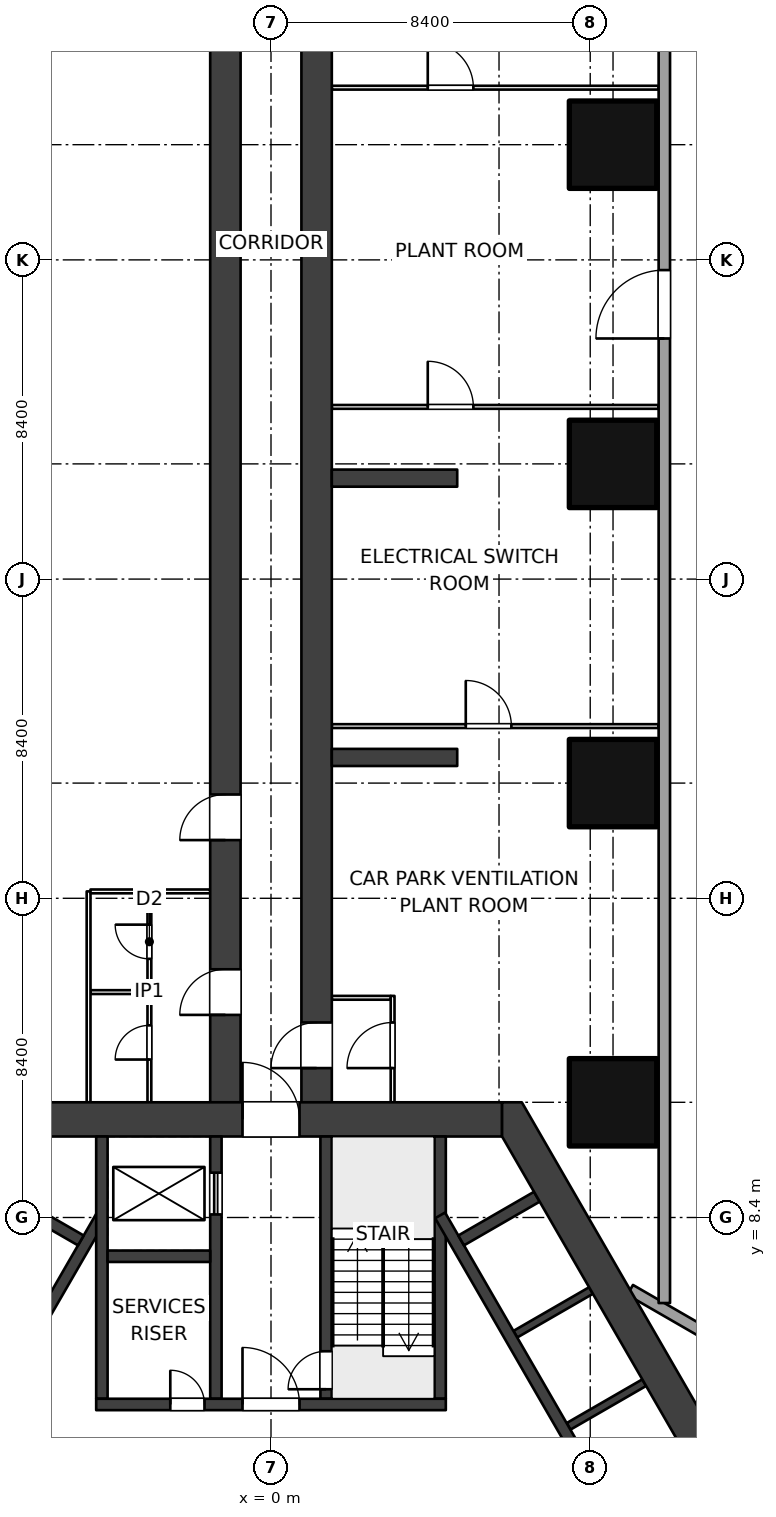
"""IFC4 building model, lengths in metres.
Left out: names, types, materials, properties, quantities, classifications, styles, units other than length and angle.
Written with IfcOpenShell. Run it as: python <this file> out.ifc"""

import sys

from ifc_helpers import new_model, si_unit, direction, frame, frame_2d, origin, origin_2d, place, context, subcontext, project, spatial, polyline, rectangle, outline, extrude, element, fill, save


model = new_model("IFC4")
c1 = context("Model", 3, precision=1e-05, world=origin(), true_north=direction((0.0, 1.0)))
c2 = subcontext(c1, "Body", "Model", "MODEL_VIEW")
j1 = project(units=[si_unit("LENGTHUNIT", "METRE"), si_unit("PLANEANGLEUNIT", "RADIAN")], contexts=[c1])
p1 = place(None, origin())
s1 = spatial("IfcSite", under=j1, at=p1, CompositionType="ELEMENT")
p2 = place(p1, origin())
s2 = spatial("IfcBuilding", under=s1, at=p2, CompositionType="ELEMENT")
p3 = place(p2, frame((0.0, 0.0, -3.5)))
s3 = spatial("IfcBuildingStorey", under=s2, at=p3, CompositionType="ELEMENT", Elevation=-3.5)
for number, where, z_axis, x_axis in (
    (1, (9.0, 11.432, 0.0), (0.0, 0.0, 1.0), (1.0, 0.0, 0.0)),
    (2, (9.0, 19.832, 0.0), (0.0, 0.0, 1.0), (1.0, 0.0, 0.0)),
    (3, (9.0, 28.231, 0.0), (0.0, 0.0, 1.0), (1.0, 0.0, 0.0)),
    (4, (9.0, 36.632, 0.0), (0.0, 0.0, 1.0), (1.0, 0.0, 0.0)),
):
    element("IfcColumn", number, at=place(p3, frame(where, z_axis=z_axis, x_axis=x_axis)), inside=s3, PredefinedType="COLUMN", context=c2, shape_type="SweptSolid", body=[
        extrude(rectangle(XDim=2.3, YDim=2.3, at=origin_2d()), origin(), (0.0, 0.0, 1.0), 3.5),
    ])
p4 = place(p3, frame((-6.08, 10.981, 0.0), z_axis=(0.0, 0.0, 1.0), x_axis=(1.0, 0.0, 0.0)))
e5 = element("IfcWall", 5, at=p4, inside=s3, PredefinedType="SHEAR", context=c2, shape_type="SweptSolid", body=[
    extrude(rectangle(XDim=12.161, YDim=0.9, at=frame_2d((6.08, 0.0))), origin(), (0.0, 0.0, 1.0), 3.5),
])
p5 = place(p4, frame((5.33, 0.0, 0.0)))
e6 = element("IfcOpeningElement", 6, at=p5, cuts=e5, PredefinedType="OPENING", context=c2, shape_type="SweptSolid", body=[
    extrude(rectangle(XDim=1.5, YDim=2.1, at=frame_2d((0.75, 1.05))), frame((0.0, 0.46, 0.0), z_axis=(0.0, -1.0, 0.0), x_axis=(1.0, 0.0, 0.0)), (0.0, 0.0, 1.0), 0.92),
])
p6 = place(p3, origin())
e7 = element("IfcWall", 7, at=p6, inside=s3, PredefinedType="SHEAR", context=c2, shape_type="SweptSolid", body=[
    extrude(outline(polyline([(13.2, 0.0), (6.6, 11.432), (6.08, 11.432), (6.08, 10.531), (12.161, 0.0), (12.94, -0.45), (13.2, 0.0)])), origin(), (0.0, 0.0, 1.0), 3.5),
])
p7 = place(p3, frame((-4.6, 3.48, 0.0), z_axis=(0.0, 0.0, 1.0), x_axis=(1.0, 0.0, 0.0)))
e8 = element("IfcWall", 8, at=p7, inside=s3, PredefinedType="SHEAR", context=c2, shape_type="SweptSolid", body=[
    extrude(rectangle(XDim=9.2, YDim=0.3, at=frame_2d((4.6, 0.0))), origin(), (0.0, 0.0, 1.0), 3.5),
])
p8 = place(p7, frame((3.85, 0.0, 0.0)))
e9 = element("IfcOpeningElement", 9, at=p8, cuts=e8, PredefinedType="OPENING", context=c2, shape_type="SweptSolid", body=[
    extrude(rectangle(XDim=1.5, YDim=2.1, at=frame_2d((0.75, 1.05))), frame((0.0, 0.16, 0.0), z_axis=(0.0, -1.0, 0.0), x_axis=(1.0, 0.0, 0.0)), (0.0, 0.0, 1.0), 0.32),
])
p9 = place(p7, frame((1.95, 0.0, 0.0)))
e10 = element("IfcOpeningElement", 10, at=p9, cuts=e8, PredefinedType="OPENING", context=c2, shape_type="SweptSolid", body=[
    extrude(rectangle(XDim=0.9, YDim=2.1, at=frame_2d((0.45, 1.05))), frame((0.0, 0.16, 0.0), z_axis=(0.0, -1.0, 0.0), x_axis=(1.0, 0.0, 0.0)), (0.0, 0.0, 1.0), 0.32),
])
p10 = place(p3, frame((1.45, 3.63, 0.0), z_axis=(0.0, 0.0, 1.0), x_axis=(0.0, 1.0, 0.0)))
e11 = element("IfcWall", 11, at=p10, inside=s3, PredefinedType="SHEAR", context=c2, shape_type="SweptSolid", body=[
    extrude(rectangle(XDim=6.902, YDim=0.3, at=frame_2d((3.451, 0.0))), origin(), (0.0, 0.0, 1.0), 3.5),
])
p11 = place(p10, frame((0.25, 0.0, 0.0)))
e12 = element("IfcOpeningElement", 12, at=p11, cuts=e11, PredefinedType="OPENING", context=c2, shape_type="SweptSolid", body=[
    extrude(rectangle(XDim=1.0, YDim=2.1, at=frame_2d((0.5, 1.05))), frame((0.0, 0.16, 0.0), z_axis=(0.0, -1.0, 0.0), x_axis=(1.0, 0.0, 0.0)), (0.0, 0.0, 1.0), 0.32),
])
p12 = place(p3, frame((4.45, 3.63, 0.0), z_axis=(0.0, 0.0, 1.0), x_axis=(0.0, 1.0, 0.0)))
e13 = element("IfcWall", 13, at=p12, inside=s3, PredefinedType="SHEAR", context=c2, shape_type="SweptSolid", body=[
    extrude(rectangle(XDim=6.902, YDim=0.3, at=frame_2d((3.451, 0.0))), origin(), (0.0, 0.0, 1.0), 3.5),
])
p13 = place(p3, frame((-1.45, 3.63, 0.0), z_axis=(0.0, 0.0, 1.0), x_axis=(0.0, 1.0, 0.0)))
e14 = element("IfcWall", 14, at=p13, inside=s3, PredefinedType="SHEAR", context=c2, shape_type="SweptSolid", body=[
    extrude(rectangle(XDim=6.902, YDim=0.3, at=frame_2d((3.451, 0.0))), origin(), (0.0, 0.0, 1.0), 3.5),
])
p14 = place(p13, frame((4.85, 0.0, 0.0)))
e15 = element("IfcOpeningElement", 15, at=p14, cuts=e14, PredefinedType="OPENING", context=c2, shape_type="SweptSolid", body=[
    extrude(rectangle(XDim=1.1, YDim=2.1, at=frame_2d((0.55, 1.05))), frame((0.0, 0.16, 0.0), z_axis=(0.0, -1.0, 0.0), x_axis=(1.0, 0.0, 0.0)), (0.0, 0.0, 1.0), 0.32),
])
p15 = place(p3, frame((-4.45, 3.63, 0.0), z_axis=(0.0, 0.0, 1.0), x_axis=(0.0, 1.0, 0.0)))
e16 = element("IfcWall", 16, at=p15, inside=s3, PredefinedType="SHEAR", context=c2, shape_type="SweptSolid", body=[
    extrude(rectangle(XDim=6.902, YDim=0.3, at=frame_2d((3.451, 0.0))), origin(), (0.0, 0.0, 1.0), 3.5),
])
p16 = place(p3, frame((-4.3, 7.38, 0.0), z_axis=(0.0, 0.0, 1.0), x_axis=(1.0, 0.0, 0.0)))
e17 = element("IfcWall", 17, at=p16, inside=s3, PredefinedType="SHEAR", context=c2, shape_type="SweptSolid", body=[
    extrude(rectangle(XDim=2.7, YDim=0.3, at=frame_2d((1.35, 0.0))), origin(), (0.0, 0.0, 1.0), 3.5),
])
p17 = place(p3, frame((4.45, 8.455, 0.0), z_axis=(0.0, 0.0, 1.0), x_axis=(0.500002290144, -0.866024081565, 0.0)))
e18 = element("IfcWall", 18, at=p17, inside=s3, PredefinedType="SHEAR", context=c2, shape_type="SweptSolid", body=[
    extrude(rectangle(XDim=10.195, YDim=0.3, at=frame_2d((5.098, 0.0))), origin(), (0.0, 0.0, 1.0), 3.5),
])
p18 = place(p3, frame((5.004, 7.796, 0.0), z_axis=(0.0, 0.0, 1.0), x_axis=(0.866053019151, 0.499952165731, 0.0)))
e19 = element("IfcWall", 19, at=p18, inside=s3, PredefinedType="SHEAR", context=c2, shape_type="SweptSolid", body=[
    extrude(rectangle(XDim=2.3, YDim=0.3, at=frame_2d((1.15, 0.0))), origin(), (0.0, 0.0, 1.0), 3.5),
])
for number, where, z_axis, x_axis in (
    (20, (6.429, 5.328, 0.0), (0.0, 0.0, 1.0), (0.866, 0.5, 0.0)),
    (21, (7.829, 2.903, 0.0), (0.0, 0.0, 1.0), (0.866, 0.5, 0.0)),
):
    element("IfcWall", number, at=place(p3, frame(where, z_axis=z_axis, x_axis=x_axis)), inside=s3, PredefinedType="SHEAR", context=c2, shape_type="SweptSolid", body=[
        extrude(rectangle(XDim=2.3, YDim=0.2, at=frame_2d((1.15, 0.0))), origin(), (0.0, 0.0, 1.0), 3.5),
    ])
p19 = place(p3, frame((-9.548, -0.374, 0.0), z_axis=(0.0, 0.0, 1.0), x_axis=(0.500002290144, 0.866024081565, 0.0)))
e22 = element("IfcWall", 22, at=p19, inside=s3, PredefinedType="SHEAR", context=c2, shape_type="SweptSolid", body=[
    extrude(rectangle(XDim=10.195, YDim=0.3, at=frame_2d((5.098, 0.0))), origin(), (0.0, 0.0, 1.0), 3.5),
])
p20 = place(p3, frame((-5.004, 7.796, 0.0), z_axis=(0.0, 0.0, 1.0), x_axis=(-0.866053019151, 0.499952165731, 0.0)))
e23 = element("IfcWall", 23, at=p20, inside=s3, PredefinedType="SHEAR", context=c2, shape_type="SweptSolid", body=[
    extrude(rectangle(XDim=2.3, YDim=0.3, at=frame_2d((1.15, 0.0))), origin(), (0.0, 0.0, 1.0), 3.5),
])
p21 = place(p3, frame((-1.2, 10.981, 0.0), z_axis=(0.0, 0.0, 1.0), x_axis=(0.0, 1.0, 0.0)))
e24 = element("IfcWall", 24, at=p21, inside=s3, PredefinedType="SHEAR", context=c2, shape_type="SweptSolid", body=[
    extrude(rectangle(XDim=36.75, YDim=0.8, at=frame_2d((18.375, 0.0))), origin(), (0.0, 0.0, 1.0), 3.5),
])
p22 = place(p21, frame((2.75, 0.0, 0.0)))
e25 = element("IfcOpeningElement", 25, at=p22, cuts=e24, PredefinedType="OPENING", context=c2, shape_type="SweptSolid", body=[
    extrude(rectangle(XDim=1.2, YDim=2.1, at=frame_2d((0.6, 1.05))), frame((0.0, 0.41, 0.0), z_axis=(0.0, -1.0, 0.0), x_axis=(1.0, 0.0, 0.0)), (0.0, 0.0, 1.0), 0.82),
])
p23 = place(p21, frame((7.35, 0.0, 0.0)))
e26 = element("IfcOpeningElement", 26, at=p23, cuts=e24, PredefinedType="OPENING", context=c2, shape_type="SweptSolid", body=[
    extrude(rectangle(XDim=1.2, YDim=2.1, at=frame_2d((0.6, 1.05))), frame((0.0, 0.41, 0.0), z_axis=(0.0, -1.0, 0.0), x_axis=(1.0, 0.0, 0.0)), (0.0, 0.0, 1.0), 0.82),
])
p24 = place(p3, frame((1.2, 10.981, 0.0), z_axis=(0.0, 0.0, 1.0), x_axis=(0.0, 1.0, 0.0)))
e27 = element("IfcWall", 27, at=p24, inside=s3, PredefinedType="SHEAR", context=c2, shape_type="SweptSolid", body=[
    extrude(rectangle(XDim=36.75, YDim=0.8, at=frame_2d((18.375, 0.0))), origin(), (0.0, 0.0, 1.0), 3.5),
])
p25 = place(p24, frame((1.35, 0.0, 0.0)))
e28 = element("IfcOpeningElement", 28, at=p25, cuts=e27, PredefinedType="OPENING", context=c2, shape_type="SweptSolid", body=[
    extrude(rectangle(XDim=1.2, YDim=2.1, at=frame_2d((0.6, 1.05))), frame((0.0, 0.41, 0.0), z_axis=(0.0, -1.0, 0.0), x_axis=(1.0, 0.0, 0.0)), (0.0, 0.0, 1.0), 0.82),
])
p26 = place(p3, frame((-3.2, 11.432, 0.0), z_axis=(0.0, 0.0, 1.0), x_axis=(0.0, 1.0, 0.0)))
e29 = element("IfcWall", 29, at=p26, inside=s3, PredefinedType="PARTITIONING", context=c2, shape_type="SweptSolid", body=[
    extrude(rectangle(XDim=5.6, YDim=0.1, at=frame_2d((2.8, 0.0))), origin(), (0.0, 0.0, 1.0), 3.15),
])
p27 = place(p26, frame((1.125, 0.0, 0.0)))
e30 = element("IfcOpeningElement", 30, at=p27, cuts=e29, PredefinedType="OPENING", context=c2, shape_type="SweptSolid", body=[
    extrude(rectangle(XDim=0.9, YDim=2.1, at=frame_2d((0.45, 1.05))), frame((0.0, 0.06, 0.0), z_axis=(0.0, -1.0, 0.0), x_axis=(1.0, 0.0, 0.0)), (0.0, 0.0, 1.0), 0.12),
])
p28 = place(p26, frame((3.775, 0.0, 0.0)))
e31 = element("IfcOpeningElement", 31, at=p28, cuts=e29, PredefinedType="OPENING", context=c2, shape_type="SweptSolid", body=[
    extrude(rectangle(XDim=0.9, YDim=2.1, at=frame_2d((0.45, 1.05))), frame((0.0, 0.06, 0.0), z_axis=(0.0, -1.0, 0.0), x_axis=(1.0, 0.0, 0.0)), (0.0, 0.0, 1.0), 0.12),
])
p29 = place(p3, frame((-3.25, 14.332, 0.0), z_axis=(0.0, 0.0, 1.0), x_axis=(-1.0, 0.0, 0.0)))
e32 = element("IfcWall", 32, at=p29, inside=s3, PredefinedType="PARTITIONING", context=c2, shape_type="SweptSolid", body=[
    extrude(rectangle(XDim=1.5, YDim=0.1, at=frame_2d((0.75, 0.0))), origin(), (0.0, 0.0, 1.0), 3.15),
])
p30 = place(p3, frame((-4.8, 11.432, 0.0), z_axis=(0.0, 0.0, 1.0), x_axis=(0.0, 1.0, 0.0)))
e33 = element("IfcWall", 33, at=p30, inside=s3, PredefinedType="PARTITIONING", context=c2, shape_type="SweptSolid", body=[
    extrude(rectangle(XDim=5.55, YDim=0.1, at=frame_2d((2.775, 0.0))), origin(), (0.0, 0.0, 1.0), 3.15),
])
p31 = place(p3, frame((-1.6, 16.981, 0.0), z_axis=(0.0, 0.0, 1.0), x_axis=(-1.0, 0.0, 0.0)))
e34 = element("IfcWall", 34, at=p31, inside=s3, PredefinedType="PARTITIONING", context=c2, shape_type="SweptSolid", body=[
    extrude(rectangle(XDim=3.15, YDim=0.1, at=frame_2d((1.575, 0.0))), origin(), (0.0, 0.0, 1.0), 3.15),
])
p32 = place(p3, frame((3.2, 11.432, 0.0), z_axis=(0.0, 0.0, 1.0), x_axis=(0.0, 1.0, 0.0)))
e35 = element("IfcWall", 35, at=p32, inside=s3, PredefinedType="PARTITIONING", context=c2, shape_type="SweptSolid", body=[
    extrude(rectangle(XDim=2.8, YDim=0.1, at=frame_2d((1.4, 0.0))), origin(), (0.0, 0.0, 1.0), 3.15),
])
p33 = place(p32, frame((0.9, 0.0, 0.0)))
e36 = element("IfcOpeningElement", 36, at=p33, cuts=e35, PredefinedType="OPENING", context=c2, shape_type="SweptSolid", body=[
    extrude(rectangle(XDim=1.2, YDim=2.1, at=frame_2d((0.6, 1.05))), frame((0.0, 0.06, 0.0), z_axis=(0.0, -1.0, 0.0), x_axis=(1.0, 0.0, 0.0)), (0.0, 0.0, 1.0), 0.12),
])
p34 = place(p3, frame((1.6, 14.182, 0.0), z_axis=(0.0, 0.0, 1.0), x_axis=(1.0, 0.0, 0.0)))
e37 = element("IfcWall", 37, at=p34, inside=s3, PredefinedType="PARTITIONING", context=c2, shape_type="SweptSolid", body=[
    extrude(rectangle(XDim=1.55, YDim=0.1, at=frame_2d((0.775, 0.0))), origin(), (0.0, 0.0, 1.0), 3.15),
])
p35 = place(p3, frame((1.6, 21.332, 0.0), z_axis=(0.0, 0.0, 1.0), x_axis=(1.0, 0.0, 0.0)))
e38 = element("IfcWall", 38, at=p35, inside=s3, PredefinedType="PARTITIONING", context=c2, shape_type="SweptSolid", body=[
    extrude(rectangle(XDim=8.6, YDim=0.1, at=frame_2d((4.3, 0.0))), origin(), (0.0, 0.0, 1.0), 3.15),
])
p36 = place(p35, frame((3.525, 0.0, 0.0)))
e39 = element("IfcOpeningElement", 39, at=p36, cuts=e38, PredefinedType="OPENING", context=c2, shape_type="SweptSolid", body=[
    extrude(rectangle(XDim=1.2, YDim=2.1, at=frame_2d((0.6, 1.05))), frame((0.0, 0.06, 0.0), z_axis=(0.0, -1.0, 0.0), x_axis=(1.0, 0.0, 0.0)), (0.0, 0.0, 1.0), 0.12),
])
p37 = place(p3, frame((1.6, 29.731, 0.0), z_axis=(0.0, 0.0, 1.0), x_axis=(1.0, 0.0, 0.0)))
e40 = element("IfcWall", 40, at=p37, inside=s3, PredefinedType="PARTITIONING", context=c2, shape_type="SweptSolid", body=[
    extrude(rectangle(XDim=8.6, YDim=0.1, at=frame_2d((4.3, 0.0))), origin(), (0.0, 0.0, 1.0), 3.15),
])
p38 = place(p37, frame((2.525, 0.0, 0.0)))
e41 = element("IfcOpeningElement", 41, at=p38, cuts=e40, PredefinedType="OPENING", context=c2, shape_type="SweptSolid", body=[
    extrude(rectangle(XDim=1.2, YDim=2.1, at=frame_2d((0.6, 1.05))), frame((0.0, 0.06, 0.0), z_axis=(0.0, -1.0, 0.0), x_axis=(1.0, 0.0, 0.0)), (0.0, 0.0, 1.0), 0.12),
])
p39 = place(p3, frame((1.6, 38.132, 0.0), z_axis=(0.0, 0.0, 1.0), x_axis=(1.0, 0.0, 0.0)))
e42 = element("IfcWall", 42, at=p39, inside=s3, PredefinedType="PARTITIONING", context=c2, shape_type="SweptSolid", body=[
    extrude(rectangle(XDim=8.6, YDim=0.1, at=frame_2d((4.3, 0.0))), origin(), (0.0, 0.0, 1.0), 3.15),
])
p40 = place(p39, frame((2.525, 0.0, 0.0)))
e43 = element("IfcOpeningElement", 43, at=p40, cuts=e42, PredefinedType="OPENING", context=c2, shape_type="SweptSolid", body=[
    extrude(rectangle(XDim=1.2, YDim=2.1, at=frame_2d((0.6, 1.05))), frame((0.0, 0.06, 0.0), z_axis=(0.0, -1.0, 0.0), x_axis=(1.0, 0.0, 0.0)), (0.0, 0.0, 1.0), 0.12),
])
p41 = place(p3, frame((10.35, 6.149, 0.0), z_axis=(0.0, 0.0, 1.0), x_axis=(0.0, 1.0, 0.0)))
e44 = element("IfcWall", 44, at=p41, inside=s3, PredefinedType="SOLIDWALL", context=c2, shape_type="SweptSolid", body=[
    extrude(rectangle(XDim=41.883, YDim=0.3, at=frame_2d((20.941, 0.0))), origin(), (0.0, 0.0, 1.0), 3.15),
])
p42 = place(p41, frame((25.383, 0.0, 0.0)))
e45 = element("IfcOpeningElement", 45, at=p42, cuts=e44, PredefinedType="OPENING", context=c2, shape_type="SweptSolid", body=[
    extrude(rectangle(XDim=1.8, YDim=2.4, at=frame_2d((0.9, 1.2))), frame((0.0, 0.16, 0.0), z_axis=(0.0, -1.0, 0.0), x_axis=(1.0, 0.0, 0.0)), (0.0, 0.0, 1.0), 0.32),
])
p43 = place(p3, frame((9.45, 6.495, 0.0), z_axis=(0.0, 0.0, 1.0), x_axis=(0.866025301493, -0.500000177174, 0.0)))
e46 = element("IfcWall", 46, at=p43, inside=s3, PredefinedType="SOLIDWALL", context=c2, shape_type="SweptSolid", body=[
    extrude(rectangle(XDim=43.095, YDim=0.3, at=frame_2d((21.548, 0.0))), origin(), (0.0, 0.0, 1.0), 3.15),
])
p44 = place(p43, frame((26.595, 0.0, 0.0)))
e47 = element("IfcOpeningElement", 47, at=p44, cuts=e46, PredefinedType="OPENING", context=c2, shape_type="SweptSolid", body=[
    extrude(rectangle(XDim=1.8, YDim=2.4, at=frame_2d((0.9, 1.2))), frame((0.0, 0.16, 0.0), z_axis=(0.0, -1.0, 0.0), x_axis=(1.0, 0.0, 0.0)), (0.0, 0.0, 1.0), 0.32),
])
for number, where, z_axis, x_axis in (
    (48, (1.6, 20.507, 0.0), (0.0, 0.0, 1.0), (1.0, 0.0, 0.0)),
    (49, (1.6, 27.856, 0.0), (0.0, 0.0, 1.0), (1.0, 0.0, 0.0)),
):
    element("IfcWall", number, at=place(p3, frame(where, z_axis=z_axis, x_axis=x_axis)), inside=s3, PredefinedType="SOLIDWALL", context=c2, shape_type="SweptSolid", body=[
        extrude(rectangle(XDim=3.3, YDim=0.45, at=frame_2d((1.65, 0.0))), origin(), (0.0, 0.0, 1.0), 3.5),
    ])
p45 = place(p14, origin())
e50 = element("IfcDoor", 50, at=p45, inside=s3, OperationType="DOUBLE_DOOR_SLIDING", PredefinedType="DOOR", context=c2, shape_type="SweptSolid", body=[
    extrude(rectangle(XDim=1.1, YDim=2.1, at=frame_2d((0.55, 1.05))), frame((0.0, 0.025, 0.0), z_axis=(0.0, -1.0, 0.0), x_axis=(1.0, 0.0, 0.0)), (0.0, 0.0, 1.0), 0.05),
])
fill(e15, e50)
p46 = place(p8, origin())
e51 = element("IfcDoor", 51, at=p46, inside=s3, OperationType="DOUBLE_DOOR_DOUBLE_SWING", PredefinedType="DOOR", context=c2, shape_type="SweptSolid", body=[
    extrude(rectangle(XDim=1.5, YDim=2.1, at=frame_2d((0.75, 1.05))), frame((0.0, 0.025, 0.0), z_axis=(0.0, -1.0, 0.0), x_axis=(1.0, 0.0, 0.0)), (0.0, 0.0, 1.0), 0.05),
])
fill(e9, e51)
p47 = place(p9, origin())
e52 = element("IfcDoor", 52, at=p47, inside=s3, OperationType="SINGLE_SWING_LEFT", PredefinedType="DOOR", context=c2, shape_type="SweptSolid", body=[
    extrude(rectangle(XDim=0.9, YDim=2.1, at=frame_2d((0.45, 1.05))), frame((0.0, 0.025, 0.0), z_axis=(0.0, -1.0, 0.0), x_axis=(1.0, 0.0, 0.0)), (0.0, 0.0, 1.0), 0.05),
])
fill(e10, e52)
p48 = place(p11, origin())
e53 = element("IfcDoor", 53, at=p48, inside=s3, OperationType="SINGLE_SWING_LEFT", PredefinedType="DOOR", context=c2, shape_type="SweptSolid", body=[
    extrude(rectangle(XDim=1.0, YDim=2.1, at=frame_2d((0.5, 1.05))), frame((0.0, 0.025, 0.0), z_axis=(0.0, -1.0, 0.0), x_axis=(1.0, 0.0, 0.0)), (0.0, 0.0, 1.0), 0.05),
])
fill(e12, e53)
p49 = place(p5, origin())
e54 = element("IfcDoor", 54, at=p49, inside=s3, OperationType="DOUBLE_DOOR_DOUBLE_SWING", PredefinedType="DOOR", context=c2, shape_type="SweptSolid", body=[
    extrude(rectangle(XDim=1.5, YDim=2.1, at=frame_2d((0.75, 1.05))), frame((0.0, 0.025, 0.0), z_axis=(0.0, -1.0, 0.0), x_axis=(1.0, 0.0, 0.0)), (0.0, 0.0, 1.0), 0.05),
])
fill(e6, e54)
p50 = place(p27, origin())
e55 = element("IfcDoor", 55, at=p50, inside=s3, OperationType="SINGLE_SWING_LEFT", PredefinedType="DOOR", context=c2, shape_type="SweptSolid", body=[
    extrude(rectangle(XDim=0.9, YDim=2.1, at=frame_2d((0.45, 1.05))), frame((0.0, 0.025, 0.0), z_axis=(0.0, -1.0, 0.0), x_axis=(1.0, 0.0, 0.0)), (0.0, 0.0, 1.0), 0.05),
])
fill(e30, e55)
p51 = place(p28, origin())
e56 = element("IfcDoor", 56, at=p51, inside=s3, OperationType="SINGLE_SWING_RIGHT", PredefinedType="DOOR", context=c2, shape_type="SweptSolid", body=[
    extrude(rectangle(XDim=0.9, YDim=2.1, at=frame_2d((0.45, 1.05))), frame((0.0, 0.025, 0.0), z_axis=(0.0, -1.0, 0.0), x_axis=(1.0, 0.0, 0.0)), (0.0, 0.0, 1.0), 0.05),
])
fill(e31, e56)
p52 = place(p22, origin())
e57 = element("IfcDoor", 57, at=p52, inside=s3, OperationType="DOUBLE_SWING_LEFT", PredefinedType="DOOR", context=c2, shape_type="SweptSolid", body=[
    extrude(rectangle(XDim=1.2, YDim=2.1, at=frame_2d((0.6, 1.05))), frame((0.0, 0.025, 0.0), z_axis=(0.0, -1.0, 0.0), x_axis=(1.0, 0.0, 0.0)), (0.0, 0.0, 1.0), 0.05),
])
fill(e25, e57)
p53 = place(p23, origin())
e58 = element("IfcDoor", 58, at=p53, inside=s3, OperationType="DOUBLE_SWING_LEFT", PredefinedType="DOOR", context=c2, shape_type="SweptSolid", body=[
    extrude(rectangle(XDim=1.2, YDim=2.1, at=frame_2d((0.6, 1.05))), frame((0.0, 0.025, 0.0), z_axis=(0.0, -1.0, 0.0), x_axis=(1.0, 0.0, 0.0)), (0.0, 0.0, 1.0), 0.05),
])
fill(e26, e58)
p54 = place(p25, origin())
e59 = element("IfcDoor", 59, at=p54, inside=s3, OperationType="DOUBLE_SWING_LEFT", PredefinedType="DOOR", context=c2, shape_type="SweptSolid", body=[
    extrude(rectangle(XDim=1.2, YDim=2.1, at=frame_2d((0.6, 1.05))), frame((0.0, 0.025, 0.0), z_axis=(0.0, -1.0, 0.0), x_axis=(1.0, 0.0, 0.0)), (0.0, 0.0, 1.0), 0.05),
])
fill(e28, e59)
p55 = place(p36, origin())
e60 = element("IfcDoor", 60, at=p55, inside=s3, OperationType="DOUBLE_SWING_LEFT", PredefinedType="DOOR", context=c2, shape_type="SweptSolid", body=[
    extrude(rectangle(XDim=1.2, YDim=2.1, at=frame_2d((0.6, 1.05))), frame((0.0, 0.025, 0.0), z_axis=(0.0, -1.0, 0.0), x_axis=(1.0, 0.0, 0.0)), (0.0, 0.0, 1.0), 0.05),
])
fill(e39, e60)
p56 = place(p38, origin())
e61 = element("IfcDoor", 61, at=p56, inside=s3, OperationType="DOUBLE_SWING_LEFT", PredefinedType="DOOR", context=c2, shape_type="SweptSolid", body=[
    extrude(rectangle(XDim=1.2, YDim=2.1, at=frame_2d((0.6, 1.05))), frame((0.0, 0.025, 0.0), z_axis=(0.0, -1.0, 0.0), x_axis=(1.0, 0.0, 0.0)), (0.0, 0.0, 1.0), 0.05),
])
fill(e41, e61)
p57 = place(p40, origin())
e62 = element("IfcDoor", 62, at=p57, inside=s3, OperationType="DOUBLE_SWING_LEFT", PredefinedType="DOOR", context=c2, shape_type="SweptSolid", body=[
    extrude(rectangle(XDim=1.2, YDim=2.1, at=frame_2d((0.6, 1.05))), frame((0.0, 0.025, 0.0), z_axis=(0.0, -1.0, 0.0), x_axis=(1.0, 0.0, 0.0)), (0.0, 0.0, 1.0), 0.05),
])
fill(e43, e62)
p58 = place(p33, origin())
e63 = element("IfcDoor", 63, at=p58, inside=s3, OperationType="DOUBLE_SWING_LEFT", PredefinedType="DOOR", context=c2, shape_type="SweptSolid", body=[
    extrude(rectangle(XDim=1.2, YDim=2.1, at=frame_2d((0.6, 1.05))), frame((0.0, 0.025, 0.0), z_axis=(0.0, -1.0, 0.0), x_axis=(1.0, 0.0, 0.0)), (0.0, 0.0, 1.0), 0.05),
])
fill(e36, e63)
p59 = place(p42, origin())
e64 = element("IfcDoor", 64, at=p59, inside=s3, OperationType="DOUBLE_DOOR_DOUBLE_SWING", PredefinedType="DOOR", context=c2, shape_type="SweptSolid", body=[
    extrude(rectangle(XDim=1.8, YDim=2.4, at=frame_2d((0.9, 1.2))), frame((0.0, 0.025, 0.0), z_axis=(0.0, -1.0, 0.0), x_axis=(1.0, 0.0, 0.0)), (0.0, 0.0, 1.0), 0.05),
])
fill(e45, e64)
save(model, sys.argv[1])
